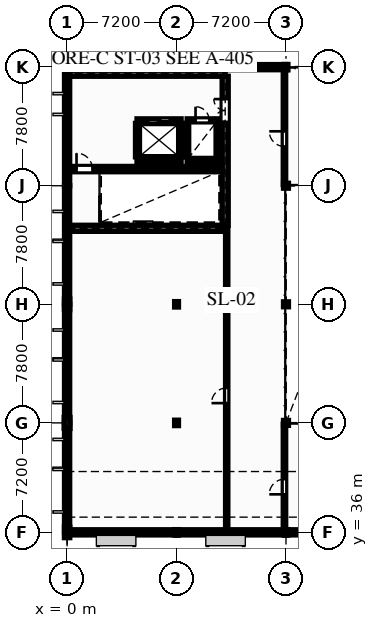
"""IFC4 building model, lengths in metres.
Left out: names, types, materials, properties, quantities, classifications, styles, units other than length and angle.
Written with IfcOpenShell. Run it as: python <this file> out.ifc"""

import sys

from ifc_helpers import new_model, si_unit, direction, frame, frame_2d, origin, origin_2d, place, context, subcontext, project, spatial, rectangle, hollow_circle, i_section, extrude, element, fill, save


model = new_model("IFC4")
c1 = context("Model", 3, precision=1e-05, world=origin(), true_north=direction((0.0, 1.0)))
c2 = subcontext(c1, "Body", "Model", "MODEL_VIEW")
j1 = project(units=[si_unit("LENGTHUNIT", "METRE"), si_unit("PLANEANGLEUNIT", "RADIAN")], contexts=[c1])
p1 = place(None, origin())
s1 = spatial("IfcSite", under=j1, at=p1, CompositionType="ELEMENT")
p2 = place(p1, origin())
s2 = spatial("IfcBuilding", under=s1, at=p2, CompositionType="ELEMENT")
p3 = place(p2, frame((0.0, 0.0, 16.52)))
s3 = spatial("IfcBuildingStorey", under=s2, at=p3, CompositionType="ELEMENT", Elevation=16.52)
p4 = place(p3, frame((0.0, 36.0, 0.0), z_axis=(0.0, 0.0, 1.0), x_axis=(1.0, 0.0, 0.0)))
e1 = element("IfcColumn", 1, at=p4, inside=s3, PredefinedType="PILASTER", context=c2, shape_type="SweptSolid", body=[
    extrude(rectangle(XDim=0.35, YDim=0.7, at=origin_2d()), origin(), (0.0, 0.0, 1.0), 3.74),
])
p5 = place(p3, frame((0.0, 43.2, 0.0), z_axis=(0.0, 0.0, 1.0), x_axis=(1.0, 0.0, 0.0)))
e2 = element("IfcColumn", 2, at=p5, inside=s3, PredefinedType="PILASTER", context=c2, shape_type="SweptSolid", body=[
    extrude(rectangle(XDim=0.38, YDim=0.72, at=origin_2d()), origin(), (0.0, 0.0, 1.0), 3.74),
])
p6 = place(p3, frame((0.0, 51.0, 0.0), z_axis=(0.0, 0.0, 1.0), x_axis=(1.0, 0.0, 0.0)))
e3 = element("IfcColumn", 3, at=p6, inside=s3, PredefinedType="PILASTER", context=c2, shape_type="SweptSolid", body=[
    extrude(rectangle(XDim=0.35, YDim=0.7, at=origin_2d()), origin(), (0.0, 0.0, 1.0), 3.74),
])
for number, where, z_axis, x_axis in (
    (4, (7.2, 36.0, 0.0), (0.0, 0.0, 1.0), (1.0, 0.0, 0.0)),
    (5, (7.2, 43.2, 0.0), (0.0, 0.0, 1.0), (1.0, 0.0, 0.0)),
    (6, (7.2, 51.0, 0.0), (0.0, 0.0, 1.0), (1.0, 0.0, 0.0)),
    (7, (14.4, 36.0, 0.0), (0.0, 0.0, 1.0), (1.0, 0.0, 0.0)),
):
    element("IfcColumn", number, at=place(p3, frame(where, z_axis=z_axis, x_axis=x_axis)), inside=s3, PredefinedType="COLUMN", context=c2, shape_type="SweptSolid", body=[
        extrude(i_section(OverallWidth=0.254, OverallDepth=0.356, WebThickness=0.01, FlangeThickness=0.018, at=origin_2d()), origin(), (0.0, 0.0, 1.0), 3.74),
    ])
for number, where, z_axis, x_axis in (
    (8, (14.4, 43.2, 0.0), (0.0, 0.0, 1.0), (1.0, 0.0, 0.0)),
    (9, (14.4, 51.0, 0.0), (0.0, 0.0, 1.0), (1.0, 0.0, 0.0)),
    (10, (14.4, 58.8, 0.0), (0.0, 0.0, 1.0), (1.0, 0.0, 0.0)),
):
    element("IfcColumn", number, at=place(p3, frame(where, z_axis=z_axis, x_axis=x_axis)), inside=s3, PredefinedType="COLUMN", context=c2, shape_type="SweptSolid", body=[
        extrude(hollow_circle(Radius=0.162, WallThickness=0.012, at=origin_2d()), origin(), (0.0, 0.0, 1.0), 3.74),
    ])
p7 = place(p3, frame((14.4, 66.6, 0.0), z_axis=(0.0, 0.0, 1.0), x_axis=(1.0, 0.0, 0.0)))
e11 = element("IfcColumn", 11, at=p7, inside=s3, PredefinedType="COLUMN", context=c2, shape_type="SweptSolid", body=[
    extrude(i_section(OverallWidth=0.254, OverallDepth=0.356, WebThickness=0.01, FlangeThickness=0.018, at=origin_2d()), origin(), (0.0, 0.0, 1.0), 3.74),
])
p8 = place(p3, frame((0.0, 36.0, 0.0), z_axis=(0.0, 0.0, 1.0), x_axis=(0.0, 1.0, 0.0)))
e12 = element("IfcWall", 12, at=p8, inside=s3, PredefinedType="SOLIDWALL", context=c2, shape_type="SweptSolid", body=[
    extrude(rectangle(XDim=7.2, YDim=0.34, at=frame_2d((3.6, 0.0))), origin(), (0.0, 0.0, 1.0), 3.46),
])
p9 = place(p8, frame((1.5, 0.0, 0.85)))
e13 = element("IfcOpeningElement", 13, at=p9, cuts=e12, PredefinedType="OPENING", context=c2, shape_type="SweptSolid", body=[
    extrude(rectangle(XDim=2.55, YDim=1.45, at=frame_2d((1.275, 0.725))), frame((0.0, 0.18, 0.0), z_axis=(0.0, -1.0, 0.0), x_axis=(1.0, 0.0, 0.0)), (0.0, 0.0, 1.0), 0.36),
])
p10 = place(p8, frame((4.3, 0.0, 0.718)))
e14 = element("IfcOpeningElement", 14, at=p10, cuts=e12, PredefinedType="OPENING", context=c2, shape_type="SweptSolid", body=[
    extrude(rectangle(XDim=1.65, YDim=2.25, at=frame_2d((0.825, 1.125))), frame((0.0, 0.18, 0.0), z_axis=(0.0, -1.0, 0.0), x_axis=(1.0, 0.0, 0.0)), (0.0, 0.0, 1.0), 0.36),
])
p11 = place(p3, frame((0.0, 43.2, 0.0), z_axis=(0.0, 0.0, 1.0), x_axis=(0.0, 1.0, 0.0)))
e15 = element("IfcWall", 15, at=p11, inside=s3, PredefinedType="SOLIDWALL", context=c2, shape_type="SweptSolid", body=[
    extrude(rectangle(XDim=7.8, YDim=0.34, at=frame_2d((3.9, 0.0))), origin(), (0.0, 0.0, 1.0), 3.46),
])
p12 = place(p11, frame((1.5, 0.0, 0.85)))
e16 = element("IfcOpeningElement", 16, at=p12, cuts=e15, PredefinedType="OPENING", context=c2, shape_type="SweptSolid", body=[
    extrude(rectangle(XDim=2.55, YDim=1.45, at=frame_2d((1.275, 0.725))), frame((0.0, 0.18, 0.0), z_axis=(0.0, -1.0, 0.0), x_axis=(1.0, 0.0, 0.0)), (0.0, 0.0, 1.0), 0.36),
])
p13 = place(p11, frame((4.3, 0.0, 0.718)))
e17 = element("IfcOpeningElement", 17, at=p13, cuts=e15, PredefinedType="OPENING", context=c2, shape_type="SweptSolid", body=[
    extrude(rectangle(XDim=1.65, YDim=2.25, at=frame_2d((0.825, 1.125))), frame((0.0, 0.18, 0.0), z_axis=(0.0, -1.0, 0.0), x_axis=(1.0, 0.0, 0.0)), (0.0, 0.0, 1.0), 0.36),
])
p14 = place(p3, frame((0.0, 51.0, 0.0), z_axis=(0.0, 0.0, 1.0), x_axis=(0.0, 1.0, 0.0)))
e18 = element("IfcWall", 18, at=p14, inside=s3, PredefinedType="SOLIDWALL", context=c2, shape_type="SweptSolid", body=[
    extrude(rectangle(XDim=7.8, YDim=0.34, at=frame_2d((3.9, 0.0))), origin(), (0.0, 0.0, 1.0), 3.46),
])
p15 = place(p14, frame((1.5, 0.0, 0.85)))
e19 = element("IfcOpeningElement", 19, at=p15, cuts=e18, PredefinedType="OPENING", context=c2, shape_type="SweptSolid", body=[
    extrude(rectangle(XDim=2.55, YDim=1.45, at=frame_2d((1.275, 0.725))), frame((0.0, 0.18, 0.0), z_axis=(0.0, -1.0, 0.0), x_axis=(1.0, 0.0, 0.0)), (0.0, 0.0, 1.0), 0.36),
])
p16 = place(p3, frame((0.0, 58.8, 0.0), z_axis=(0.0, 0.0, 1.0), x_axis=(0.0, 1.0, 0.0)))
e20 = element("IfcWall", 20, at=p16, inside=s3, PredefinedType="SOLIDWALL", context=c2, shape_type="SweptSolid", body=[
    extrude(rectangle(XDim=7.8, YDim=0.34, at=frame_2d((3.9, 0.0))), origin(), (0.0, 0.0, 1.0), 3.46),
])
p17 = place(p16, frame((4.85, 0.0, 1.1)))
e21 = element("IfcOpeningElement", 21, at=p17, cuts=e20, PredefinedType="OPENING", context=c2, shape_type="SweptSolid", body=[
    extrude(rectangle(XDim=1.05, YDim=1.75, at=frame_2d((0.525, 0.875))), frame((0.0, 0.18, 0.0), z_axis=(0.0, -1.0, 0.0), x_axis=(1.0, 0.0, 0.0)), (0.0, 0.0, 1.0), 0.36),
])
p18 = place(p3, frame((0.0, 66.6, 0.0), z_axis=(0.0, 0.0, 1.0), x_axis=(1.0, 0.0, 0.0)))
e22 = element("IfcWall", 22, at=p18, inside=s3, PredefinedType="SOLIDWALL", context=c2, shape_type="SweptSolid", body=[
    extrude(rectangle(XDim=7.2, YDim=0.34, at=frame_2d((3.6, 0.0))), origin(), (0.0, 0.0, 1.0), 3.46),
])
p19 = place(p18, frame((2.2, 0.0, 0.9)))
e23 = element("IfcOpeningElement", 23, at=p19, cuts=e22, PredefinedType="OPENING", context=c2, shape_type="SweptSolid", body=[
    extrude(rectangle(XDim=1.75, YDim=2.15, at=frame_2d((0.875, 1.075))), frame((0.0, 0.18, 0.0), z_axis=(0.0, -1.0, 0.0), x_axis=(1.0, 0.0, 0.0)), (0.0, 0.0, 1.0), 0.36),
])
p20 = place(p3, frame((0.0, 36.0, 0.0), z_axis=(0.0, 0.0, 1.0), x_axis=(1.0, 0.0, 0.0)))
e24 = element("IfcWall", 24, at=p20, inside=s3, PredefinedType="SOLIDWALL", context=c2, shape_type="SweptSolid", body=[
    extrude(rectangle(XDim=7.2, YDim=0.34, at=frame_2d((3.6, 0.0))), origin(), (0.0, 0.0, 1.0), 3.46),
])
p21 = place(p20, frame((2.2, 0.0, 0.9)))
e25 = element("IfcOpeningElement", 25, at=p21, cuts=e24, PredefinedType="OPENING", context=c2, shape_type="SweptSolid", body=[
    extrude(rectangle(XDim=2.05, YDim=1.85, at=frame_2d((1.025, 0.925))), frame((0.0, 0.18, 0.0), z_axis=(0.0, -1.0, 0.0), x_axis=(1.0, 0.0, 0.0)), (0.0, 0.0, 1.0), 0.36),
])
p22 = place(p3, frame((7.2, 66.6, 0.0), z_axis=(0.0, 0.0, 1.0), x_axis=(1.0, 0.0, 0.0)))
e26 = element("IfcWall", 26, at=p22, inside=s3, PredefinedType="SOLIDWALL", context=c2, shape_type="SweptSolid", body=[
    extrude(rectangle(XDim=7.2, YDim=0.34, at=frame_2d((3.6, 0.0))), origin(), (0.0, 0.0, 1.0), 3.46),
])
p23 = place(p22, frame((4.4, 0.0, 0.9)))
e27 = element("IfcOpeningElement", 27, at=p23, cuts=e26, PredefinedType="OPENING", context=c2, shape_type="SweptSolid", body=[
    extrude(rectangle(XDim=1.75, YDim=2.15, at=frame_2d((0.875, 1.075))), frame((0.0, 0.18, 0.0), z_axis=(0.0, -1.0, 0.0), x_axis=(1.0, 0.0, 0.0)), (0.0, 0.0, 1.0), 0.36),
])
p24 = place(p3, frame((7.2, 36.0, 0.0), z_axis=(0.0, 0.0, 1.0), x_axis=(1.0, 0.0, 0.0)))
e28 = element("IfcWall", 28, at=p24, inside=s3, PredefinedType="SOLIDWALL", context=c2, shape_type="SweptSolid", body=[
    extrude(rectangle(XDim=7.2, YDim=0.34, at=frame_2d((3.6, 0.0))), origin(), (0.0, 0.0, 1.0), 3.46),
])
p25 = place(p24, frame((4.4, 0.0, 0.9)))
e29 = element("IfcOpeningElement", 29, at=p25, cuts=e28, PredefinedType="OPENING", context=c2, shape_type="SweptSolid", body=[
    extrude(rectangle(XDim=2.05, YDim=1.85, at=frame_2d((1.025, 0.925))), frame((0.0, 0.18, 0.0), z_axis=(0.0, -1.0, 0.0), x_axis=(1.0, 0.0, 0.0)), (0.0, 0.0, 1.0), 0.36),
])
p26 = place(p3, frame((14.4, 36.0, 0.0), z_axis=(0.0, 0.0, 1.0), x_axis=(1.0, 0.0, 0.0)))
e30 = element("IfcWall", 30, at=p26, inside=s3, PredefinedType="SOLIDWALL", context=c2, shape_type="SweptSolid", body=[
    extrude(rectangle(XDim=7.2, YDim=0.34, at=frame_2d((3.6, 0.0))), origin(), (0.0, 0.0, 1.0), 3.46),
])
p27 = place(p26, frame((2.2, 0.0, 0.9)))
e31 = element("IfcOpeningElement", 31, at=p27, cuts=e30, PredefinedType="OPENING", context=c2, shape_type="SweptSolid", body=[
    extrude(rectangle(XDim=2.05, YDim=1.85, at=frame_2d((1.025, 0.925))), frame((0.0, 0.18, 0.0), z_axis=(0.0, -1.0, 0.0), x_axis=(1.0, 0.0, 0.0)), (0.0, 0.0, 1.0), 0.36),
])
for number, where, z_axis, x_axis in (
    (32, (0.17, 56.0, 0.0), (0.0, 0.0, 1.0), (1.0, 0.0, 0.0)),
    (33, (0.17, 66.2, 0.0), (0.0, 0.0, 1.0), (1.0, 0.0, 0.0)),
):
    element("IfcWall", number, at=place(p3, frame(where, z_axis=z_axis, x_axis=x_axis)), inside=s3, PredefinedType="SHEAR", context=c2, shape_type="SweptSolid", body=[
        extrude(rectangle(XDim=10.23, YDim=0.4, at=frame_2d((5.115, 0.0))), origin(), (0.0, 0.0, 1.0), 3.46),
    ])
p28 = place(p3, frame((10.4, 56.2, 0.0), z_axis=(0.0, 0.0, 1.0), x_axis=(0.0, 1.0, 0.0)))
e34 = element("IfcWall", 34, at=p28, inside=s3, PredefinedType="SHEAR", context=c2, shape_type="SweptSolid", body=[
    extrude(rectangle(XDim=9.8, YDim=0.4, at=frame_2d((4.9, 0.0))), origin(), (0.0, 0.0, 1.0), 3.46),
])
p29 = place(p28, frame((6.8, 0.0, 0.0)))
e35 = element("IfcOpeningElement", 35, at=p29, cuts=e34, PredefinedType="OPENING", context=c2, shape_type="SweptSolid", body=[
    extrude(rectangle(XDim=1.5, YDim=2.2, at=frame_2d((0.75, 1.1))), frame((0.0, 0.21, 0.0), z_axis=(0.0, -1.0, 0.0), x_axis=(1.0, 0.0, 0.0)), (0.0, 0.0, 1.0), 0.42),
])
p30 = place(p3, frame((0.17, 59.895, 0.0), z_axis=(0.0, 0.0, 1.0), x_axis=(1.0, 0.0, 0.0)))
e36 = element("IfcWall", 36, at=p30, inside=s3, PredefinedType="SHEAR", context=c2, shape_type="SweptSolid", body=[
    extrude(rectangle(XDim=10.03, YDim=0.35, at=frame_2d((5.015, 0.0))), origin(), (0.0, 0.0, 1.0), 3.46),
])
p31 = place(p30, frame((0.45, 0.0, 0.0)))
e37 = element("IfcOpeningElement", 37, at=p31, cuts=e36, PredefinedType="OPENING", context=c2, shape_type="SweptSolid", body=[
    extrude(rectangle(XDim=1.05, YDim=2.2, at=frame_2d((0.525, 1.1))), frame((0.0, 0.185, 0.0), z_axis=(0.0, -1.0, 0.0), x_axis=(1.0, 0.0, 0.0)), (0.0, 0.0, 1.0), 0.37),
])
p32 = place(p3, frame((4.6, 60.5, 0.0), z_axis=(0.0, 0.0, 1.0), x_axis=(1.0, 0.0, 0.0)))
e38 = element("IfcWall", 38, at=p32, inside=s3, PredefinedType="PARTITIONING", context=c2, shape_type="SweptSolid", body=[
    extrude(rectangle(XDim=2.9, YDim=0.2, at=frame_2d((1.45, 0.0))), origin(), (0.0, 0.0, 1.0), 3.46),
])
p33 = place(p3, frame((4.6, 63.1, 0.0), z_axis=(0.0, 0.0, 1.0), x_axis=(1.0, 0.0, 0.0)))
e39 = element("IfcWall", 39, at=p33, inside=s3, PredefinedType="PARTITIONING", context=c2, shape_type="SweptSolid", body=[
    extrude(rectangle(XDim=2.9, YDim=0.2, at=frame_2d((1.45, 0.0))), origin(), (0.0, 0.0, 1.0), 3.46),
])
p34 = place(p33, frame((0.75, 0.0, 0.0)))
e40 = element("IfcOpeningElement", 40, at=p34, cuts=e39, PredefinedType="OPENING", context=c2, shape_type="SweptSolid", body=[
    extrude(rectangle(XDim=1.4, YDim=2.25, at=frame_2d((0.7, 1.125))), frame((0.0, 0.11, 0.0), z_axis=(0.0, -1.0, 0.0), x_axis=(1.0, 0.0, 0.0)), (0.0, 0.0, 1.0), 0.22),
])
for number, where, z_axis, x_axis in (
    (41, (4.6, 60.7, 0.0), (0.0, 0.0, 1.0), (0.0, 1.0, 0.0)),
    (42, (7.5, 60.7, 0.0), (0.0, 0.0, 1.0), (0.0, 1.0, 0.0)),
):
    element("IfcWall", number, at=place(p3, frame(where, z_axis=z_axis, x_axis=x_axis)), inside=s3, PredefinedType="PARTITIONING", context=c2, shape_type="SweptSolid", body=[
        extrude(rectangle(XDim=2.2, YDim=0.2, at=frame_2d((1.1, 0.0))), origin(), (0.0, 0.0, 1.0), 3.46),
    ])
p35 = place(p3, frame((7.9, 60.5, 0.0), z_axis=(0.0, 0.0, 1.0), x_axis=(1.0, 0.0, 0.0)))
e43 = element("IfcWall", 43, at=p35, inside=s3, PredefinedType="PARTITIONING", context=c2, shape_type="SweptSolid", body=[
    extrude(rectangle(XDim=2.0, YDim=0.2, at=frame_2d((1.0, 0.0))), origin(), (0.0, 0.0, 1.0), 3.46),
])
p36 = place(p3, frame((7.9, 63.1, 0.0), z_axis=(0.0, 0.0, 1.0), x_axis=(1.0, 0.0, 0.0)))
e44 = element("IfcWall", 44, at=p36, inside=s3, PredefinedType="PARTITIONING", context=c2, shape_type="SweptSolid", body=[
    extrude(rectangle(XDim=2.0, YDim=0.2, at=frame_2d((1.0, 0.0))), origin(), (0.0, 0.0, 1.0), 3.46),
])
p37 = place(p36, frame((0.55, 0.0, 0.0)))
e45 = element("IfcOpeningElement", 45, at=p37, cuts=e44, PredefinedType="OPENING", context=c2, shape_type="SweptSolid", body=[
    extrude(rectangle(XDim=0.9, YDim=2.1, at=frame_2d((0.45, 1.05))), frame((0.0, 0.11, 0.0), z_axis=(0.0, -1.0, 0.0), x_axis=(1.0, 0.0, 0.0)), (0.0, 0.0, 1.0), 0.22),
])
for number, where, z_axis, x_axis in (
    (46, (7.9, 60.7, 0.0), (0.0, 0.0, 1.0), (0.0, 1.0, 0.0)),
    (47, (9.9, 60.7, 0.0), (0.0, 0.0, 1.0), (0.0, 1.0, 0.0)),
):
    element("IfcWall", number, at=place(p3, frame(where, z_axis=z_axis, x_axis=x_axis)), inside=s3, PredefinedType="PARTITIONING", context=c2, shape_type="SweptSolid", body=[
        extrude(rectangle(XDim=2.2, YDim=0.2, at=frame_2d((1.1, 0.0))), origin(), (0.0, 0.0, 1.0), 3.46),
    ])
p38 = place(p3, frame((14.3, 36.0, 0.0), z_axis=(0.0, 0.0, 1.0), x_axis=(0.0, 1.0, 0.0)))
e48 = element("IfcWall", 48, at=p38, inside=s3, PredefinedType="PARTITIONING", context=c2, shape_type="SweptSolid", body=[
    extrude(rectangle(XDim=7.12, YDim=0.16, at=frame_2d((3.56, 0.0))), origin(), (0.0, 0.0, 1.0), 2.863),
])
p39 = place(p38, frame((2.5, 0.0, 0.0)))
e49 = element("IfcOpeningElement", 49, at=p39, cuts=e48, PredefinedType="OPENING", context=c2, shape_type="SweptSolid", body=[
    extrude(rectangle(XDim=1.0, YDim=2.15, at=frame_2d((0.5, 1.075))), frame((0.0, 0.09, 0.0), z_axis=(0.0, -1.0, 0.0), x_axis=(1.0, 0.0, 0.0)), (0.0, 0.0, 1.0), 0.18),
])
p40 = place(p3, frame((14.3, 58.88, 0.0), z_axis=(0.0, 0.0, 1.0), x_axis=(0.0, 1.0, 0.0)))
e50 = element("IfcWall", 50, at=p40, inside=s3, PredefinedType="PARTITIONING", context=c2, shape_type="SweptSolid", body=[
    extrude(rectangle(XDim=7.72, YDim=0.16, at=frame_2d((3.86, 0.0))), origin(), (0.0, 0.0, 1.0), 2.863),
])
p41 = place(p40, frame((2.5, 0.0, 0.0)))
e51 = element("IfcOpeningElement", 51, at=p41, cuts=e50, PredefinedType="OPENING", context=c2, shape_type="SweptSolid", body=[
    extrude(rectangle(XDim=1.0, YDim=2.15, at=frame_2d((0.5, 1.075))), frame((0.0, 0.09, 0.0), z_axis=(0.0, -1.0, 0.0), x_axis=(1.0, 0.0, 0.0)), (0.0, 0.0, 1.0), 0.18),
])
p42 = place(p3, frame((10.5, 36.0, 0.0), z_axis=(0.0, 0.0, 1.0), x_axis=(0.0, 1.0, 0.0)))
e52 = element("IfcWall", 52, at=p42, inside=s3, PredefinedType="PARTITIONING", context=c2, shape_type="SweptSolid", body=[
    extrude(rectangle(XDim=20.0, YDim=0.15, at=frame_2d((10.0, 0.0))), origin(), (0.0, 0.0, 1.0), 3.46),
])
p43 = place(p42, frame((8.5, 0.0, 0.0)))
e53 = element("IfcOpeningElement", 53, at=p43, cuts=e52, PredefinedType="OPENING", context=c2, shape_type="SweptSolid", body=[
    extrude(rectangle(XDim=1.0, YDim=2.15, at=frame_2d((0.5, 1.075))), frame((0.0, 0.085, 0.0), z_axis=(0.0, -1.0, 0.0), x_axis=(1.0, 0.0, 0.0)), (0.0, 0.0, 1.0), 0.17),
])
p44 = place(p9, origin())
e54 = element("IfcWindow", 54, at=p44, inside=s3, PartitioningType="SINGLE_PANEL", PredefinedType="WINDOW", context=c2, shape_type="SweptSolid", body=[
    extrude(rectangle(XDim=2.55, YDim=1.45, at=frame_2d((1.275, 0.725))), frame((0.0, 0.03, 0.0), z_axis=(0.0, -1.0, 0.0), x_axis=(1.0, 0.0, 0.0)), (0.0, 0.0, 1.0), 0.06),
])
fill(e13, e54)
p45 = place(p10, origin())
e55 = element("IfcWindow", 55, at=p45, inside=s3, PartitioningType="SINGLE_PANEL", PredefinedType="WINDOW", context=c2, shape_type="SweptSolid", body=[
    extrude(rectangle(XDim=1.65, YDim=2.25, at=frame_2d((0.825, 1.125))), frame((0.0, 0.03, 0.0), z_axis=(0.0, -1.0, 0.0), x_axis=(1.0, 0.0, 0.0)), (0.0, 0.0, 1.0), 0.06),
])
fill(e14, e55)
p46 = place(p12, origin())
e56 = element("IfcWindow", 56, at=p46, inside=s3, PartitioningType="SINGLE_PANEL", PredefinedType="WINDOW", context=c2, shape_type="SweptSolid", body=[
    extrude(rectangle(XDim=2.55, YDim=1.45, at=frame_2d((1.275, 0.725))), frame((0.0, 0.03, 0.0), z_axis=(0.0, -1.0, 0.0), x_axis=(1.0, 0.0, 0.0)), (0.0, 0.0, 1.0), 0.06),
])
fill(e16, e56)
p47 = place(p13, origin())
e57 = element("IfcWindow", 57, at=p47, inside=s3, PartitioningType="SINGLE_PANEL", PredefinedType="WINDOW", context=c2, shape_type="SweptSolid", body=[
    extrude(rectangle(XDim=1.65, YDim=2.25, at=frame_2d((0.825, 1.125))), frame((0.0, 0.03, 0.0), z_axis=(0.0, -1.0, 0.0), x_axis=(1.0, 0.0, 0.0)), (0.0, 0.0, 1.0), 0.06),
])
fill(e17, e57)
p48 = place(p15, origin())
e58 = element("IfcWindow", 58, at=p48, inside=s3, PartitioningType="SINGLE_PANEL", PredefinedType="WINDOW", context=c2, shape_type="SweptSolid", body=[
    extrude(rectangle(XDim=2.55, YDim=1.45, at=frame_2d((1.275, 0.725))), frame((0.0, 0.03, 0.0), z_axis=(0.0, -1.0, 0.0), x_axis=(1.0, 0.0, 0.0)), (0.0, 0.0, 1.0), 0.06),
])
fill(e19, e58)
p49 = place(p17, origin())
e59 = element("IfcWindow", 59, at=p49, inside=s3, PartitioningType="SINGLE_PANEL", PredefinedType="WINDOW", context=c2, shape_type="SweptSolid", body=[
    extrude(rectangle(XDim=1.05, YDim=1.75, at=frame_2d((0.525, 0.875))), frame((0.0, 0.03, 0.0), z_axis=(0.0, -1.0, 0.0), x_axis=(1.0, 0.0, 0.0)), (0.0, 0.0, 1.0), 0.06),
])
fill(e21, e59)
p50 = place(p19, origin())
e60 = element("IfcWindow", 60, at=p50, inside=s3, PartitioningType="SINGLE_PANEL", PredefinedType="WINDOW", context=c2, shape_type="SweptSolid", body=[
    extrude(rectangle(XDim=1.75, YDim=2.15, at=frame_2d((0.875, 1.075))), frame((0.0, 0.03, 0.0), z_axis=(0.0, -1.0, 0.0), x_axis=(1.0, 0.0, 0.0)), (0.0, 0.0, 1.0), 0.06),
])
fill(e23, e60)
p51 = place(p21, origin())
e61 = element("IfcWindow", 61, at=p51, inside=s3, PartitioningType="SINGLE_PANEL", PredefinedType="WINDOW", context=c2, shape_type="SweptSolid", body=[
    extrude(rectangle(XDim=2.05, YDim=1.85, at=frame_2d((1.025, 0.925))), frame((0.0, 0.03, 0.0), z_axis=(0.0, -1.0, 0.0), x_axis=(1.0, 0.0, 0.0)), (0.0, 0.0, 1.0), 0.06),
])
fill(e25, e61)
p52 = place(p23, origin())
e62 = element("IfcWindow", 62, at=p52, inside=s3, PartitioningType="SINGLE_PANEL", PredefinedType="WINDOW", context=c2, shape_type="SweptSolid", body=[
    extrude(rectangle(XDim=1.75, YDim=2.15, at=frame_2d((0.875, 1.075))), frame((0.0, 0.03, 0.0), z_axis=(0.0, -1.0, 0.0), x_axis=(1.0, 0.0, 0.0)), (0.0, 0.0, 1.0), 0.06),
])
fill(e27, e62)
p53 = place(p25, origin())
e63 = element("IfcWindow", 63, at=p53, inside=s3, PartitioningType="SINGLE_PANEL", PredefinedType="WINDOW", context=c2, shape_type="SweptSolid", body=[
    extrude(rectangle(XDim=2.05, YDim=1.85, at=frame_2d((1.025, 0.925))), frame((0.0, 0.03, 0.0), z_axis=(0.0, -1.0, 0.0), x_axis=(1.0, 0.0, 0.0)), (0.0, 0.0, 1.0), 0.06),
])
fill(e29, e63)
p54 = place(p29, origin())
e64 = element("IfcDoor", 64, at=p54, inside=s3, OperationType="DOUBLE_DOOR_SINGLE_SWING", PredefinedType="DOOR", context=c2, shape_type="SweptSolid", body=[
    extrude(rectangle(XDim=1.5, YDim=2.2, at=frame_2d((0.75, 1.1))), frame((0.0, 0.025, 0.0), z_axis=(0.0, -1.0, 0.0), x_axis=(1.0, 0.0, 0.0)), (0.0, 0.0, 1.0), 0.05),
])
fill(e35, e64)
p55 = place(p31, origin())
e65 = element("IfcDoor", 65, at=p55, inside=s3, OperationType="SINGLE_SWING_LEFT", PredefinedType="DOOR", context=c2, shape_type="SweptSolid", body=[
    extrude(rectangle(XDim=1.05, YDim=2.2, at=frame_2d((0.525, 1.1))), frame((0.0, 0.025, 0.0), z_axis=(0.0, -1.0, 0.0), x_axis=(1.0, 0.0, 0.0)), (0.0, 0.0, 1.0), 0.05),
])
fill(e37, e65)
p56 = place(p34, origin())
e66 = element("IfcDoor", 66, at=p56, inside=s3, OperationType="SLIDING_TO_LEFT", PredefinedType="DOOR", context=c2, shape_type="SweptSolid", body=[
    extrude(rectangle(XDim=1.4, YDim=2.25, at=frame_2d((0.7, 1.125))), frame((0.0, 0.025, 0.0), z_axis=(0.0, -1.0, 0.0), x_axis=(1.0, 0.0, 0.0)), (0.0, 0.0, 1.0), 0.05),
])
fill(e40, e66)
p57 = place(p37, origin())
e67 = element("IfcDoor", 67, at=p57, inside=s3, OperationType="SINGLE_SWING_LEFT", PredefinedType="DOOR", context=c2, shape_type="SweptSolid", body=[
    extrude(rectangle(XDim=0.9, YDim=2.1, at=frame_2d((0.45, 1.05))), frame((0.0, 0.025, 0.0), z_axis=(0.0, -1.0, 0.0), x_axis=(1.0, 0.0, 0.0)), (0.0, 0.0, 1.0), 0.05),
])
fill(e45, e67)
p58 = place(p39, origin())
e68 = element("IfcDoor", 68, at=p58, inside=s3, OperationType="SINGLE_SWING_LEFT", PredefinedType="DOOR", context=c2, shape_type="SweptSolid", body=[
    extrude(rectangle(XDim=1.0, YDim=2.15, at=frame_2d((0.5, 1.075))), frame((0.0, 0.025, 0.0), z_axis=(0.0, -1.0, 0.0), x_axis=(1.0, 0.0, 0.0)), (0.0, 0.0, 1.0), 0.05),
])
fill(e49, e68)
p59 = place(p41, origin())
e69 = element("IfcDoor", 69, at=p59, inside=s3, OperationType="SINGLE_SWING_RIGHT", PredefinedType="DOOR", context=c2, shape_type="SweptSolid", body=[
    extrude(rectangle(XDim=1.0, YDim=2.15, at=frame_2d((0.5, 1.075))), frame((0.0, 0.025, 0.0), z_axis=(0.0, -1.0, 0.0), x_axis=(1.0, 0.0, 0.0)), (0.0, 0.0, 1.0), 0.05),
])
fill(e51, e69)
p60 = place(p43, origin())
e70 = element("IfcDoor", 70, at=p60, inside=s3, OperationType="SINGLE_SWING_LEFT", PredefinedType="DOOR", context=c2, shape_type="SweptSolid", body=[
    extrude(rectangle(XDim=1.0, YDim=2.15, at=frame_2d((0.5, 1.075))), frame((0.0, 0.025, 0.0), z_axis=(0.0, -1.0, 0.0), x_axis=(1.0, 0.0, 0.0)), (0.0, 0.0, 1.0), 0.05),
])
fill(e53, e70)
save(model, sys.argv[1])
